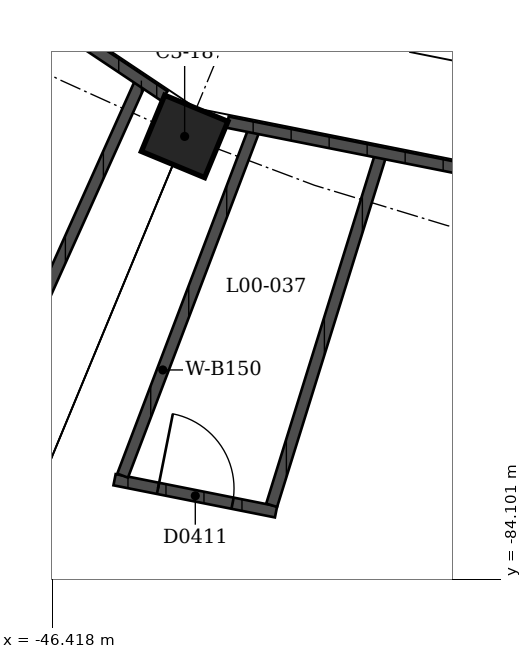
"""IFC4 building model, lengths in metres.
Left out: names, types, materials, properties, quantities, classifications, styles, units other than length and angle.
Written with IfcOpenShell. Run it as: python <this file> out.ifc"""

import sys

from ifc_helpers import new_model, si_unit, direction, frame, frame_2d, origin, origin_2d, place, context, subcontext, project, spatial, rectangle, extrude, element, fill, save


model = new_model("IFC4")
c1 = context("Model", 3, precision=1e-05, world=origin(), true_north=direction((0.0, 1.0)))
c2 = subcontext(c1, "Body", "Model", "MODEL_VIEW")
j1 = project(units=[si_unit("LENGTHUNIT", "METRE"), si_unit("PLANEANGLEUNIT", "RADIAN")], contexts=[c1])
p1 = place(None, origin())
s1 = spatial("IfcSite", under=j1, at=p1, CompositionType="ELEMENT")
p2 = place(p1, origin())
s2 = spatial("IfcBuilding", under=s1, at=p2, CompositionType="ELEMENT")
p3 = place(p2, origin())
s3 = spatial("IfcBuildingStorey", under=s2, at=p3, CompositionType="ELEMENT", Elevation=0.0)
p4 = place(p3, frame((-44.677, -78.276, 0.0), z_axis=(0.0, 0.0, 1.0), x_axis=(0.923879532511, -0.382683432365, 0.0)))
e1 = element("IfcColumn", 1, at=p4, inside=s3, PredefinedType="COLUMN", context=c2, shape_type="SweptSolid", body=[
    extrude(rectangle(XDim=0.9, YDim=0.8, at=origin_2d()), origin(), (0.0, 0.0, 1.0), 4.5),
])
p5 = place(p3, frame((-45.599, -82.793, 0.0), z_axis=(0.0, 0.0, 1.0), x_axis=(0.980788176969, -0.195075759432, 0.0)))
e2 = element("IfcWall", 2, at=p5, inside=s3, PredefinedType="SOLIDWALL", context=c2, shape_type="SweptSolid", body=[
    extrude(rectangle(XDim=2.166, YDim=0.15, at=frame_2d((1.083, 0.0))), origin(), (0.0, 0.0, 1.0), 3.0),
])
p6 = place(p5, frame((0.583, 0.0, 0.0)))
e3 = element("IfcOpeningElement", 3, at=p6, cuts=e2, PredefinedType="OPENING", context=c2, shape_type="SweptSolid", body=[
    extrude(rectangle(XDim=1.0, YDim=2.1, at=frame_2d((0.5, 1.05))), frame((0.0, 0.075, 0.0), z_axis=(0.0, -1.0, 0.0), x_axis=(1.0, 0.0, 0.0)), (0.0, 0.0, 1.0), 0.15),
])
p7 = place(p3, frame((-43.753, -78.16, 0.0), z_axis=(0.0, 0.0, 1.0), x_axis=(-0.355265667312, -0.934765374642, 0.0)))
e4 = element("IfcWall", 4, at=p7, inside=s3, PredefinedType="SOLIDWALL", context=c2, shape_type="SweptSolid", body=[
    extrude(rectangle(XDim=4.898, YDim=0.15, at=frame_2d((2.449, 0.0))), origin(), (0.0, 0.0, 1.0), 3.0),
])
p8 = place(p3, frame((-42.089, -78.491, 0.0), z_axis=(0.0, 0.0, 1.0), x_axis=(-0.297150057793, -0.954830792944, 0.0)))
e5 = element("IfcWall", 5, at=p8, inside=s3, PredefinedType="SOLIDWALL", context=c2, shape_type="SweptSolid", body=[
    extrude(rectangle(XDim=4.857, YDim=0.15, at=frame_2d((2.429, 0.0))), origin(), (0.0, 0.0, 1.0), 3.0),
])
p9 = place(p3, frame((-45.248, -77.541, 0.0), z_axis=(0.0, 0.0, 1.0), x_axis=(-0.409747004505, -0.912199206478, 0.0)))
e6 = element("IfcWall", 6, at=p9, inside=s3, PredefinedType="SOLIDWALL", context=c2, shape_type="SweptSolid", body=[
    extrude(rectangle(XDim=4.898, YDim=0.15, at=frame_2d((2.449, 0.0))), origin(), (0.0, 0.0, 1.0), 3.0),
])
p10 = place(p3, frame((-34.4, -80.021, 0.0), z_axis=(0.0, 0.0, 1.0), x_axis=(-0.980784963798, 0.195091913691, 0.0)))
e7 = element("IfcWall", 7, at=p10, inside=s3, PredefinedType="SOLIDWALL", context=c2, shape_type="SweptSolid", body=[
    extrude(rectangle(XDim=9.902, YDim=0.15, at=frame_2d((4.951, 0.0))), origin(), (0.0, 0.0, 1.0), 3.0),
])
p11 = place(p10, frame((3.806, 0.0, 0.0)))
e8 = element("IfcOpeningElement", 8, at=p11, cuts=e7, PredefinedType="OPENING", context=c2, shape_type="SweptSolid", body=[
    extrude(rectangle(XDim=2.4, YDim=2.4, at=frame_2d((1.2, 1.2))), frame((0.0, 0.075, 0.0), z_axis=(0.0, -1.0, 0.0), x_axis=(1.0, 0.0, 0.0)), (0.0, 0.0, 1.0), 0.15),
])
p12 = place(p3, frame((-44.944, -77.744, 0.0), z_axis=(0.0, 0.0, 1.0), x_axis=(-0.83147031613, 0.555569179667, 0.0)))
e9 = element("IfcWall", 9, at=p12, inside=s3, PredefinedType="SOLIDWALL", context=c2, shape_type="SweptSolid", body=[
    extrude(rectangle(XDim=9.851, YDim=0.15, at=frame_2d((4.926, 0.0))), origin(), (0.0, 0.0, 1.0), 3.0),
])
p13 = place(p6, origin())
e10 = element("IfcDoor", 10, at=p13, inside=s3, OperationType="SINGLE_SWING_RIGHT", PredefinedType="DOOR", context=c2, shape_type="SweptSolid", body=[
    extrude(rectangle(XDim=1.0, YDim=2.1, at=frame_2d((0.5, 1.05))), frame((0.0, 0.025, 0.0), z_axis=(0.0, -1.0, 0.0), x_axis=(1.0, 0.0, 0.0)), (0.0, 0.0, 1.0), 0.05),
])
fill(e3, e10)
save(model, sys.argv[1])
